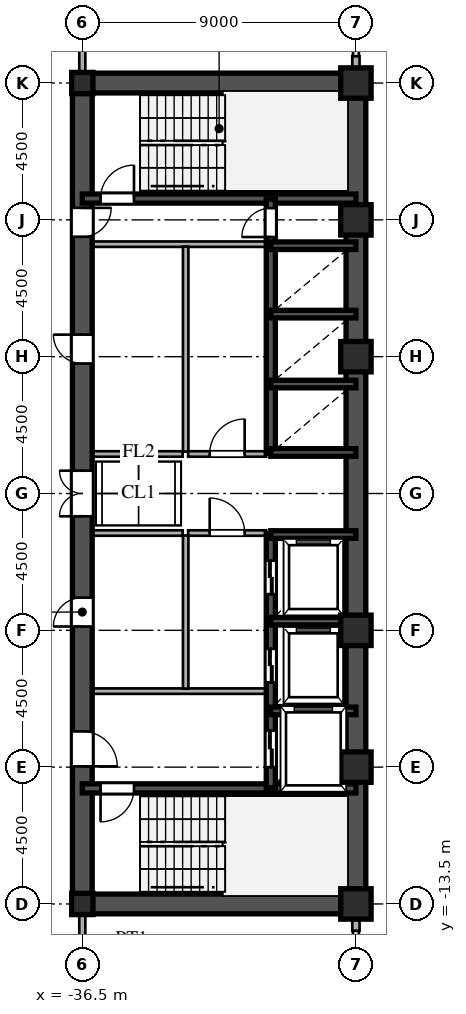
"""IFC4 building model, lengths in metres.
Left out: names, types, materials, properties, quantities, classifications, styles, units other than length and angle.
Written with IfcOpenShell. Run it as: python <this file> out.ifc"""

import sys

from ifc_helpers import new_model, si_unit, direction, frame, frame_2d, origin, origin_2d, place, context, subcontext, project, spatial, rectangle, hollow_rectangle, i_section, extrude, source, transform, mapped, element, fill, save


model = new_model("IFC4")
c1 = context("Model", 3, precision=1e-05, world=origin(), true_north=direction((0.0, 1.0)))
c2 = subcontext(c1, "Body", "Model", "MODEL_VIEW")
j1 = project(units=[si_unit("LENGTHUNIT", "METRE"), si_unit("PLANEANGLEUNIT", "RADIAN")], contexts=[c1])
p1 = place(None, origin())
s1 = spatial("IfcSite", under=j1, at=p1, CompositionType="ELEMENT")
p2 = place(p1, origin())
s2 = spatial("IfcBuilding", under=s1, at=p2, CompositionType="ELEMENT")
p3 = place(p2, frame((0.0, 0.0, 128.4)))
s3 = spatial("IfcBuildingStorey", under=s2, at=p3, CompositionType="ELEMENT", Elevation=128.4)
m1 = source(origin(), c2, "Body", "SweptSolid", [
    extrude(hollow_rectangle(XDim=1.0, YDim=1.0, WallThickness=0.042, at=origin_2d()), origin(), (0.0, 0.0, 1.0), 3.6),
])
for number, where, z_axis, x_axis in (
    (1, (-27.5, -13.5, 0.0), (0.0, 0.0, 1.0), (1.0, 0.0, 0.0)),
    (2, (-27.5, -9.0, 0.0), (0.0, 0.0, 1.0), (1.0, 0.0, 0.0)),
    (3, (-27.5, -4.5, 0.0), (0.0, 0.0, 1.0), (1.0, 0.0, 0.0)),
    (4, (-27.5, 4.5, 0.0), (0.0, 0.0, 1.0), (1.0, 0.0, 0.0)),
    (5, (-27.5, 9.0, 0.0), (0.0, 0.0, 1.0), (1.0, 0.0, 0.0)),
    (6, (-27.5, 13.5, 0.0), (0.0, 0.0, 1.0), (1.0, 0.0, 0.0)),
):
    element("IfcColumn", number, at=place(p3, frame(where, z_axis=z_axis, x_axis=x_axis)), inside=s3, PredefinedType="COLUMN", context=c2, shape_type="MappedRepresentation", body=[
        mapped(m1, transform((0.0, 0.0, 0.0), scale=1.0)),
    ])
m2 = source(origin(), c2, "Body", "SweptSolid", [
    extrude(i_section(OverallWidth=0.7, OverallDepth=0.7, WebThickness=0.028, FlangeThickness=0.045, at=origin_2d()), origin(), (0.0, 0.0, 1.0), 3.6),
])
for number, where, z_axis, x_axis in (
    (7, (-36.5, -13.5, 0.0), (0.0, 0.0, 1.0), (1.0, 0.0, 0.0)),
    (8, (-36.5, 13.5, 0.0), (0.0, 0.0, 1.0), (1.0, 0.0, 0.0)),
):
    element("IfcColumn", number, at=place(p3, frame(where, z_axis=z_axis, x_axis=x_axis)), inside=s3, PredefinedType="COLUMN", context=c2, shape_type="MappedRepresentation", body=[
        mapped(m2, transform((0.0, 0.0, 0.0), scale=1.0)),
    ])
for number, where, z_axis, x_axis in (
    (9, (-27.5, -14.38, 0.0), (0.0, 0.0, 1.0), (0.0, 1.0, 0.0)),
    (10, (-27.5, 13.83, 0.0), (0.0, 0.0, 1.0), (0.0, 1.0, 0.0)),
):
    element("IfcWall", number, at=place(p3, frame(where, z_axis=z_axis, x_axis=x_axis)), inside=s3, PredefinedType="SOLIDWALL", context=c2, shape_type="SweptSolid", body=[
        extrude(rectangle(XDim=0.55, YDim=0.24, at=frame_2d((0.275, 0.0))), origin(), (0.0, 0.0, 1.0), 2.88),
    ])
for number, where, z_axis, x_axis in (
    (11, (-27.5, -13.5, 0.0), (0.0, 0.0, 1.0), (0.0, 1.0, 0.0)),
    (12, (-27.5, 1.3, 0.0), (0.0, 0.0, 1.0), (0.0, 1.0, 0.0)),
):
    element("IfcWall", number, at=place(p3, frame(where, z_axis=z_axis, x_axis=x_axis)), inside=s3, PredefinedType="SHEAR", context=c2, shape_type="SweptSolid", body=[
        extrude(rectangle(XDim=12.2, YDim=0.65, at=frame_2d((6.1, 0.0))), origin(), (0.0, 0.0, 1.0), 3.38),
    ])
p4 = place(p3, frame((-27.5, -1.3, 0.0), z_axis=(0.0, 0.0, 1.0), x_axis=(0.0, 1.0, 0.0)))
e13 = element("IfcWall", 13, at=p4, inside=s3, PredefinedType="SHEAR", context=c2, shape_type="SweptSolid", body=[
    extrude(rectangle(XDim=2.6, YDim=0.65, at=frame_2d((1.3, 0.0))), origin(), (0.0, 0.0, 1.0), 3.38),
])
for number, where, z_axis, x_axis in (
    (14, (-36.5, -13.5, 0.0), (0.0, 0.0, 1.0), (1.0, 0.0, 0.0)),
    (15, (-36.5, 13.5, 0.0), (0.0, 0.0, 1.0), (1.0, 0.0, 0.0)),
):
    element("IfcWall", number, at=place(p3, frame(where, z_axis=z_axis, x_axis=x_axis)), inside=s3, PredefinedType="SHEAR", context=c2, shape_type="SweptSolid", body=[
        extrude(rectangle(XDim=9.0, YDim=0.65, at=frame_2d((4.5, 0.0))), origin(), (0.0, 0.0, 1.0), 3.38),
    ])
p5 = place(p3, frame((-36.5, -13.65, 0.0), z_axis=(0.0, 0.0, 1.0), x_axis=(0.0, 1.0, 0.0)))
e16 = element("IfcWall", 16, at=p5, inside=s3, PredefinedType="SHEAR", context=c2, shape_type="SweptSolid", body=[
    extrude(rectangle(XDim=7.15, YDim=0.65, at=frame_2d((3.575, 0.0))), origin(), (0.0, 0.0, 1.0), 3.38),
])
p6 = place(p5, frame((4.675, 0.0, 0.0)))
e17 = element("IfcOpeningElement", 17, at=p6, cuts=e16, PredefinedType="OPENING", context=c2, shape_type="SweptSolid", body=[
    extrude(rectangle(XDim=1.15, YDim=2.2, at=frame_2d((0.575, 1.1))), frame((0.0, 0.335, 0.0), z_axis=(0.0, -1.0, 0.0), x_axis=(1.0, 0.0, 0.0)), (0.0, 0.0, 1.0), 0.67),
])
p7 = place(p3, frame((-36.5, -1.3, 0.0), z_axis=(0.0, 0.0, 1.0), x_axis=(0.0, 1.0, 0.0)))
e18 = element("IfcWall", 18, at=p7, inside=s3, PredefinedType="SHEAR", context=c2, shape_type="SweptSolid", body=[
    extrude(rectangle(XDim=2.6, YDim=0.65, at=frame_2d((1.3, 0.0))), origin(), (0.0, 0.0, 1.0), 3.38),
])
p8 = place(p7, frame((0.55, 0.0, 0.0)))
e19 = element("IfcOpeningElement", 19, at=p8, cuts=e18, PredefinedType="OPENING", context=c2, shape_type="SweptSolid", body=[
    extrude(rectangle(XDim=1.5, YDim=2.3, at=frame_2d((0.75, 1.15))), frame((0.0, 0.335, 0.0), z_axis=(0.0, -1.0, 0.0), x_axis=(1.0, 0.0, 0.0)), (0.0, 0.0, 1.0), 0.67),
])
p9 = place(p3, frame((-36.5, 8.2, 0.0), z_axis=(0.0, 0.0, 1.0), x_axis=(0.0, 1.0, 0.0)))
e20 = element("IfcWall", 20, at=p9, inside=s3, PredefinedType="SHEAR", context=c2, shape_type="SweptSolid", body=[
    extrude(rectangle(XDim=5.45, YDim=0.65, at=frame_2d((2.725, 0.0))), origin(), (0.0, 0.0, 1.0), 3.38),
])
p10 = place(p9, frame((0.245, 0.0, 0.0)))
e21 = element("IfcOpeningElement", 21, at=p10, cuts=e20, PredefinedType="OPENING", context=c2, shape_type="SweptSolid", body=[
    extrude(rectangle(XDim=0.95, YDim=2.15, at=frame_2d((0.475, 1.075))), frame((0.0, 0.335, 0.0), z_axis=(0.0, -1.0, 0.0), x_axis=(1.0, 0.0, 0.0)), (0.0, 0.0, 1.0), 0.67),
])
p11 = place(p3, frame((-36.5, -6.5, 0.0), z_axis=(0.0, 0.0, 1.0), x_axis=(0.0, 1.0, 0.0)))
e22 = element("IfcWall", 22, at=p11, inside=s3, PredefinedType="SHEAR", context=c2, shape_type="SweptSolid", body=[
    extrude(rectangle(XDim=5.2, YDim=0.65, at=frame_2d((2.6, 0.0))), origin(), (0.0, 0.0, 1.0), 3.38),
])
p12 = place(p11, frame((2.125, 0.0, 0.0)))
e23 = element("IfcOpeningElement", 23, at=p12, cuts=e22, PredefinedType="OPENING", context=c2, shape_type="SweptSolid", body=[
    extrude(rectangle(XDim=0.95, YDim=2.15, at=frame_2d((0.475, 1.075))), frame((0.0, 0.335, 0.0), z_axis=(0.0, -1.0, 0.0), x_axis=(1.0, 0.0, 0.0)), (0.0, 0.0, 1.0), 0.67),
])
p13 = place(p3, frame((-36.5, 1.3, 0.0), z_axis=(0.0, 0.0, 1.0), x_axis=(0.0, 1.0, 0.0)))
e24 = element("IfcWall", 24, at=p13, inside=s3, PredefinedType="SHEAR", context=c2, shape_type="SweptSolid", body=[
    extrude(rectangle(XDim=6.9, YDim=0.65, at=frame_2d((3.45, 0.0))), origin(), (0.0, 0.0, 1.0), 3.38),
])
p14 = place(p13, frame((2.975, 0.0, 0.0)))
e25 = element("IfcOpeningElement", 25, at=p14, cuts=e24, PredefinedType="OPENING", context=c2, shape_type="SweptSolid", body=[
    extrude(rectangle(XDim=0.95, YDim=2.15, at=frame_2d((0.475, 1.075))), frame((0.0, 0.335, 0.0), z_axis=(0.0, -1.0, 0.0), x_axis=(1.0, 0.0, 0.0)), (0.0, 0.0, 1.0), 0.67),
])
p15 = place(p3, frame((-36.5, -9.7, 0.0), z_axis=(0.0, 0.0, 1.0), x_axis=(1.0, 0.0, 0.0)))
e26 = element("IfcWall", 26, at=p15, inside=s3, PredefinedType="SHEAR", context=c2, shape_type="SweptSolid", body=[
    extrude(rectangle(XDim=9.0, YDim=0.3, at=frame_2d((4.5, 0.0))), origin(), (0.0, 0.0, 1.0), 3.38),
])
p16 = place(p15, frame((0.6, 0.0, 0.0)))
e27 = element("IfcOpeningElement", 27, at=p16, cuts=e26, PredefinedType="OPENING", context=c2, shape_type="SweptSolid", body=[
    extrude(rectangle(XDim=1.1, YDim=2.2, at=frame_2d((0.55, 1.1))), frame((0.0, 0.16, 0.0), z_axis=(0.0, -1.0, 0.0), x_axis=(1.0, 0.0, 0.0)), (0.0, 0.0, 1.0), 0.32),
])
p17 = place(p3, frame((-36.5, 9.7, 0.0), z_axis=(0.0, 0.0, 1.0), x_axis=(1.0, 0.0, 0.0)))
e28 = element("IfcWall", 28, at=p17, inside=s3, PredefinedType="SHEAR", context=c2, shape_type="SweptSolid", body=[
    extrude(rectangle(XDim=9.0, YDim=0.3, at=frame_2d((4.5, 0.0))), origin(), (0.0, 0.0, 1.0), 3.38),
])
p18 = place(p17, frame((0.6, 0.0, 0.0)))
e29 = element("IfcOpeningElement", 29, at=p18, cuts=e28, PredefinedType="OPENING", context=c2, shape_type="SweptSolid", body=[
    extrude(rectangle(XDim=1.1, YDim=2.2, at=frame_2d((0.55, 1.1))), frame((0.0, 0.16, 0.0), z_axis=(0.0, -1.0, 0.0), x_axis=(1.0, 0.0, 0.0)), (0.0, 0.0, 1.0), 0.32),
])
for number, where, z_axis, x_axis in (
    (30, (-30.3, -7.15, 0.0), (0.0, 0.0, 1.0), (1.0, 0.0, 0.0)),
    (31, (-30.3, -4.2, 0.0), (0.0, 0.0, 1.0), (1.0, 0.0, 0.0)),
    (32, (-30.3, -1.35, 0.0), (0.0, 0.0, 1.0), (1.0, 0.0, 0.0)),
    (33, (-30.3, 1.35, 0.0), (0.0, 0.0, 1.0), (1.0, 0.0, 0.0)),
    (34, (-30.3, 3.6, 0.0), (0.0, 0.0, 1.0), (1.0, 0.0, 0.0)),
    (35, (-30.3, 5.9, 0.0), (0.0, 0.0, 1.0), (1.0, 0.0, 0.0)),
    (36, (-30.3, 8.15, 0.0), (0.0, 0.0, 1.0), (1.0, 0.0, 0.0)),
):
    element("IfcWall", number, at=place(p3, frame(where, z_axis=z_axis, x_axis=x_axis)), inside=s3, PredefinedType="SHEAR", context=c2, shape_type="SweptSolid", body=[
        extrude(rectangle(XDim=2.8, YDim=0.25, at=frame_2d((1.4, 0.0))), origin(), (0.0, 0.0, 1.0), 3.38),
    ])
p19 = place(p3, frame((-30.3, -9.68, 0.0), z_axis=(0.0, 0.0, 1.0), x_axis=(0.0, 1.0, 0.0)))
e37 = element("IfcWall", 37, at=p19, inside=s3, PredefinedType="SHEAR", context=c2, shape_type="SweptSolid", body=[
    extrude(rectangle(XDim=2.56, YDim=0.3, at=frame_2d((1.28, 0.0))), origin(), (0.0, 0.0, 1.0), 3.38),
])
p20 = place(p19, frame((0.68, 0.0, 0.0)))
e38 = element("IfcOpeningElement", 38, at=p20, cuts=e37, PredefinedType="OPENING", context=c2, shape_type="SweptSolid", body=[
    extrude(rectangle(XDim=1.2, YDim=2.25, at=frame_2d((0.6, 1.125))), frame((0.0, 0.16, 0.0), z_axis=(0.0, -1.0, 0.0), x_axis=(1.0, 0.0, 0.0)), (0.0, 0.0, 1.0), 0.32),
])
p21 = place(p3, frame((-30.3, -7.12, 0.0), z_axis=(0.0, 0.0, 1.0), x_axis=(0.0, 1.0, 0.0)))
e39 = element("IfcWall", 39, at=p21, inside=s3, PredefinedType="SHEAR", context=c2, shape_type="SweptSolid", body=[
    extrude(rectangle(XDim=2.92, YDim=0.3, at=frame_2d((1.46, 0.0))), origin(), (0.0, 0.0, 1.0), 3.38),
])
p22 = place(p21, frame((0.91, 0.0, 0.0)))
e40 = element("IfcOpeningElement", 40, at=p22, cuts=e39, PredefinedType="OPENING", context=c2, shape_type="SweptSolid", body=[
    extrude(rectangle(XDim=1.1, YDim=2.2, at=frame_2d((0.55, 1.1))), frame((0.0, 0.16, 0.0), z_axis=(0.0, -1.0, 0.0), x_axis=(1.0, 0.0, 0.0)), (0.0, 0.0, 1.0), 0.32),
])
p23 = place(p3, frame((-30.3, -4.2, 0.0), z_axis=(0.0, 0.0, 1.0), x_axis=(0.0, 1.0, 0.0)))
e41 = element("IfcWall", 41, at=p23, inside=s3, PredefinedType="SHEAR", context=c2, shape_type="SweptSolid", body=[
    extrude(rectangle(XDim=2.88, YDim=0.3, at=frame_2d((1.44, 0.0))), origin(), (0.0, 0.0, 1.0), 3.38),
])
p24 = place(p23, frame((0.89, 0.0, 0.0)))
e42 = element("IfcOpeningElement", 42, at=p24, cuts=e41, PredefinedType="OPENING", context=c2, shape_type="SweptSolid", body=[
    extrude(rectangle(XDim=1.1, YDim=2.2, at=frame_2d((0.55, 1.1))), frame((0.0, 0.16, 0.0), z_axis=(0.0, -1.0, 0.0), x_axis=(1.0, 0.0, 0.0)), (0.0, 0.0, 1.0), 0.32),
])
p25 = place(p3, frame((-30.3, 1.32, 0.0), z_axis=(0.0, 0.0, 1.0), x_axis=(0.0, 1.0, 0.0)))
e43 = element("IfcWall", 43, at=p25, inside=s3, PredefinedType="SHEAR", context=c2, shape_type="SweptSolid", body=[
    extrude(rectangle(XDim=2.28, YDim=0.3, at=frame_2d((1.14, 0.0))), origin(), (0.0, 0.0, 1.0), 3.38),
])
p26 = place(p3, frame((-30.3, 3.6, 0.0), z_axis=(0.0, 0.0, 1.0), x_axis=(0.0, 1.0, 0.0)))
e44 = element("IfcWall", 44, at=p26, inside=s3, PredefinedType="SHEAR", context=c2, shape_type="SweptSolid", body=[
    extrude(rectangle(XDim=2.3, YDim=0.3, at=frame_2d((1.15, 0.0))), origin(), (0.0, 0.0, 1.0), 3.38),
])
p27 = place(p3, frame((-30.3, 5.9, 0.0), z_axis=(0.0, 0.0, 1.0), x_axis=(0.0, 1.0, 0.0)))
e45 = element("IfcWall", 45, at=p27, inside=s3, PredefinedType="SHEAR", context=c2, shape_type="SweptSolid", body=[
    extrude(rectangle(XDim=2.25, YDim=0.3, at=frame_2d((1.125, 0.0))), origin(), (0.0, 0.0, 1.0), 3.38),
])
p28 = place(p3, frame((-30.3, 8.15, 0.0), z_axis=(0.0, 0.0, 1.0), x_axis=(0.0, 1.0, 0.0)))
e46 = element("IfcWall", 46, at=p28, inside=s3, PredefinedType="SHEAR", context=c2, shape_type="SweptSolid", body=[
    extrude(rectangle(XDim=1.53, YDim=0.3, at=frame_2d((0.765, 0.0))), origin(), (0.0, 0.0, 1.0), 3.38),
])
p29 = place(p28, frame((0.285, 0.0, 0.0)))
e47 = element("IfcOpeningElement", 47, at=p29, cuts=e46, PredefinedType="OPENING", context=c2, shape_type="SweptSolid", body=[
    extrude(rectangle(XDim=0.95, YDim=2.15, at=frame_2d((0.475, 1.075))), frame((0.0, 0.16, 0.0), z_axis=(0.0, -1.0, 0.0), x_axis=(1.0, 0.0, 0.0)), (0.0, 0.0, 1.0), 0.32),
])
for number, where, z_axis, x_axis in (
    (48, (-36.15, -6.5, 0.0), (0.0, 0.0, 1.0), (1.0, 0.0, 0.0)),
    (49, (-36.15, 8.2, 0.0), (0.0, 0.0, 1.0), (1.0, 0.0, 0.0)),
):
    element("IfcWall", number, at=place(p3, frame(where, z_axis=z_axis, x_axis=x_axis)), inside=s3, PredefinedType="PARTITIONING", context=c2, shape_type="SweptSolid", body=[
        extrude(rectangle(XDim=5.7, YDim=0.18, at=frame_2d((2.85, 0.0))), origin(), (0.0, 0.0, 1.0), 3.38),
    ])
p30 = place(p3, frame((-33.1, -6.42, 0.0), z_axis=(0.0, 0.0, 1.0), x_axis=(0.0, 1.0, 0.0)))
e50 = element("IfcWall", 50, at=p30, inside=s3, PredefinedType="PARTITIONING", context=c2, shape_type="SweptSolid", body=[
    extrude(rectangle(XDim=5.04, YDim=0.18, at=frame_2d((2.52, 0.0))), origin(), (0.0, 0.0, 1.0), 3.38),
])
p31 = place(p3, frame((-33.1, 1.38, 0.0), z_axis=(0.0, 0.0, 1.0), x_axis=(0.0, 1.0, 0.0)))
e51 = element("IfcWall", 51, at=p31, inside=s3, PredefinedType="PARTITIONING", context=c2, shape_type="SweptSolid", body=[
    extrude(rectangle(XDim=6.74, YDim=0.18, at=frame_2d((3.37, 0.0))), origin(), (0.0, 0.0, 1.0), 3.38),
])
p32 = place(p3, frame((-33.02, -1.3, 0.0), z_axis=(0.0, 0.0, 1.0), x_axis=(1.0, 0.0, 0.0)))
e52 = element("IfcWall", 52, at=p32, inside=s3, PredefinedType="PARTITIONING", context=c2, shape_type="SweptSolid", body=[
    extrude(rectangle(XDim=2.57, YDim=0.18, at=frame_2d((1.285, 0.0))), origin(), (0.0, 0.0, 1.0), 3.38),
])
p33 = place(p32, frame((0.71, 0.0, 0.0)))
e53 = element("IfcOpeningElement", 53, at=p33, cuts=e52, PredefinedType="OPENING", context=c2, shape_type="SweptSolid", body=[
    extrude(rectangle(XDim=1.15, YDim=2.2, at=frame_2d((0.575, 1.1))), frame((0.0, 0.1, 0.0), z_axis=(0.0, -1.0, 0.0), x_axis=(1.0, 0.0, 0.0)), (0.0, 0.0, 1.0), 0.2),
])
p34 = place(p3, frame((-33.02, 1.3, 0.0), z_axis=(0.0, 0.0, 1.0), x_axis=(1.0, 0.0, 0.0)))
e54 = element("IfcWall", 54, at=p34, inside=s3, PredefinedType="PARTITIONING", context=c2, shape_type="SweptSolid", body=[
    extrude(rectangle(XDim=2.57, YDim=0.18, at=frame_2d((1.285, 0.0))), origin(), (0.0, 0.0, 1.0), 3.38),
])
p35 = place(p34, frame((0.71, 0.0, 0.0)))
e55 = element("IfcOpeningElement", 55, at=p35, cuts=e54, PredefinedType="OPENING", context=c2, shape_type="SweptSolid", body=[
    extrude(rectangle(XDim=1.15, YDim=2.2, at=frame_2d((0.575, 1.1))), frame((0.0, 0.1, 0.0), z_axis=(0.0, -1.0, 0.0), x_axis=(1.0, 0.0, 0.0)), (0.0, 0.0, 1.0), 0.2),
])
for number, where, z_axis, x_axis in (
    (56, (-36.15, -1.3, 0.0), (0.0, 0.0, 1.0), (1.0, 0.0, 0.0)),
    (57, (-36.15, 1.3, 0.0), (0.0, 0.0, 1.0), (1.0, 0.0, 0.0)),
):
    element("IfcWall", number, at=place(p3, frame(where, z_axis=z_axis, x_axis=x_axis)), inside=s3, PredefinedType="PARTITIONING", context=c2, shape_type="SweptSolid", body=[
        extrude(rectangle(XDim=2.95, YDim=0.18, at=frame_2d((1.475, 0.0))), origin(), (0.0, 0.0, 1.0), 3.38),
    ])
for number, where, z_axis, x_axis in (
    (58, (-36.5, -15.515, 0.0), (0.0, 0.0, 1.0), (0.0, 1.0, 0.0)),
    (59, (-36.5, 13.83, 0.0), (0.0, 0.0, 1.0), (0.0, 1.0, 0.0)),
):
    element("IfcWall", number, at=place(p3, frame(where, z_axis=z_axis, x_axis=x_axis)), inside=s3, PredefinedType="PARTITIONING", context=c2, shape_type="SweptSolid", body=[
        extrude(rectangle(XDim=1.685, YDim=0.2, at=frame_2d((0.842, 0.0))), origin(), (0.0, 0.0, 1.0), 2.78),
    ])
m3 = source(origin(), c2, "Body", "SweptSolid", [
    extrude(rectangle(XDim=1.15, YDim=2.2, at=frame_2d((0.575, 1.1))), frame((0.0, 0.025, 0.0), z_axis=(0.0, -1.0, 0.0), x_axis=(1.0, 0.0, 0.0)), (0.0, 0.0, 1.0), 0.05),
])
p36 = place(p6, frame((1.15, 0.0, 0.0), z_axis=(0.0, 0.0, 1.0), x_axis=(-1.0, 0.0, 0.0)))
e60 = element("IfcDoor", 60, at=p36, inside=s3, OperationType="SINGLE_SWING_LEFT", PredefinedType="DOOR", context=c2, shape_type="MappedRepresentation", body=[
    mapped(m3, transform((0.0, 0.0, 0.0), scale=1.0)),
])
fill(e17, e60)
m4 = source(origin(), c2, "Body", "SweptSolid", [
    extrude(rectangle(XDim=1.5, YDim=2.3, at=frame_2d((0.75, 1.15))), frame((0.0, 0.025, 0.0), z_axis=(0.0, -1.0, 0.0), x_axis=(1.0, 0.0, 0.0)), (0.0, 0.0, 1.0), 0.05),
])
p37 = place(p8, origin())
e61 = element("IfcDoor", 61, at=p37, inside=s3, OperationType="DOUBLE_SWING_LEFT", PredefinedType="DOOR", context=c2, shape_type="MappedRepresentation", body=[
    mapped(m4, transform((0.0, 0.0, 0.0), scale=1.0)),
])
fill(e19, e61)
m5 = source(origin(), c2, "Body", "SweptSolid", [
    extrude(rectangle(XDim=0.95, YDim=2.15, at=frame_2d((0.475, 1.075))), frame((0.0, 0.025, 0.0), z_axis=(0.0, -1.0, 0.0), x_axis=(1.0, 0.0, 0.0)), (0.0, 0.0, 1.0), 0.05),
])
p38 = place(p10, frame((0.95, 0.0, 0.0), z_axis=(0.0, 0.0, 1.0), x_axis=(-1.0, 0.0, 0.0)))
e62 = element("IfcDoor", 62, at=p38, inside=s3, OperationType="SINGLE_SWING_RIGHT", PredefinedType="DOOR", context=c2, shape_type="MappedRepresentation", body=[
    mapped(m5, transform((0.0, 0.0, 0.0), scale=1.0)),
])
fill(e21, e62)
p39 = place(p12, origin())
e63 = element("IfcDoor", 63, at=p39, inside=s3, OperationType="SINGLE_SWING_LEFT", PredefinedType="DOOR", context=c2, shape_type="MappedRepresentation", body=[
    mapped(m5, transform((0.0, 0.0, 0.0), scale=1.0)),
])
fill(e23, e63)
p40 = place(p14, origin())
e64 = element("IfcDoor", 64, at=p40, inside=s3, OperationType="SINGLE_SWING_RIGHT", PredefinedType="DOOR", context=c2, shape_type="MappedRepresentation", body=[
    mapped(m5, transform((0.0, 0.0, 0.0), scale=1.0)),
])
fill(e25, e64)
m6 = source(origin(), c2, "Body", "SweptSolid", [
    extrude(rectangle(XDim=1.1, YDim=2.2, at=frame_2d((0.55, 1.1))), frame((0.0, 0.025, 0.0), z_axis=(0.0, -1.0, 0.0), x_axis=(1.0, 0.0, 0.0)), (0.0, 0.0, 1.0), 0.05),
])
p41 = place(p16, frame((1.1, 0.0, 0.0), z_axis=(0.0, 0.0, 1.0), x_axis=(-1.0, 0.0, 0.0)))
e65 = element("IfcDoor", 65, at=p41, inside=s3, OperationType="SINGLE_SWING_LEFT", PredefinedType="DOOR", context=c2, shape_type="MappedRepresentation", body=[
    mapped(m6, transform((0.0, 0.0, 0.0), scale=1.0)),
])
fill(e27, e65)
p42 = place(p18, origin())
e66 = element("IfcDoor", 66, at=p42, inside=s3, OperationType="SINGLE_SWING_RIGHT", PredefinedType="DOOR", context=c2, shape_type="MappedRepresentation", body=[
    mapped(m6, transform((0.0, 0.0, 0.0), scale=1.0)),
])
fill(e29, e66)
m7 = source(origin(), c2, "Body", "SweptSolid", [
    extrude(rectangle(XDim=1.2, YDim=2.25, at=frame_2d((0.6, 1.125))), frame((0.0, 0.025, 0.0), z_axis=(0.0, -1.0, 0.0), x_axis=(1.0, 0.0, 0.0)), (0.0, 0.0, 1.0), 0.05),
])
p43 = place(p20, origin())
e67 = element("IfcDoor", 67, at=p43, inside=s3, OperationType="DOUBLE_DOOR_SLIDING", PredefinedType="DOOR", context=c2, shape_type="MappedRepresentation", body=[
    mapped(m7, transform((0.0, 0.0, 0.0), scale=1.0)),
])
fill(e38, e67)
m8 = source(origin(), c2, "Body", "SweptSolid", [
    extrude(rectangle(XDim=1.1, YDim=2.2, at=frame_2d((0.55, 1.1))), frame((0.0, 0.025, 0.0), z_axis=(0.0, -1.0, 0.0), x_axis=(1.0, 0.0, 0.0)), (0.0, 0.0, 1.0), 0.05),
])
p44 = place(p22, origin())
e68 = element("IfcDoor", 68, at=p44, inside=s3, OperationType="DOUBLE_DOOR_SLIDING", PredefinedType="DOOR", context=c2, shape_type="MappedRepresentation", body=[
    mapped(m8, transform((0.0, 0.0, 0.0), scale=1.0)),
])
fill(e40, e68)
p45 = place(p24, origin())
e69 = element("IfcDoor", 69, at=p45, inside=s3, OperationType="DOUBLE_DOOR_SLIDING", PredefinedType="DOOR", context=c2, shape_type="MappedRepresentation", body=[
    mapped(m8, transform((0.0, 0.0, 0.0), scale=1.0)),
])
fill(e42, e69)
p46 = place(p29, origin())
e70 = element("IfcDoor", 70, at=p46, inside=s3, OperationType="SINGLE_SWING_LEFT", PredefinedType="DOOR", context=c2, shape_type="MappedRepresentation", body=[
    mapped(m5, transform((0.0, 0.0, 0.0), scale=1.0)),
])
fill(e47, e70)
p47 = place(p33, origin())
e71 = element("IfcDoor", 71, at=p47, inside=s3, OperationType="SINGLE_SWING_LEFT", PredefinedType="DOOR", context=c2, shape_type="MappedRepresentation", body=[
    mapped(m3, transform((0.0, 0.0, 0.0), scale=1.0)),
])
fill(e53, e71)
p48 = place(p35, origin())
e72 = element("IfcDoor", 72, at=p48, inside=s3, OperationType="SINGLE_SWING_RIGHT", PredefinedType="DOOR", context=c2, shape_type="MappedRepresentation", body=[
    mapped(m3, transform((0.0, 0.0, 0.0), scale=1.0)),
])
fill(e55, e72)
save(model, sys.argv[1])
